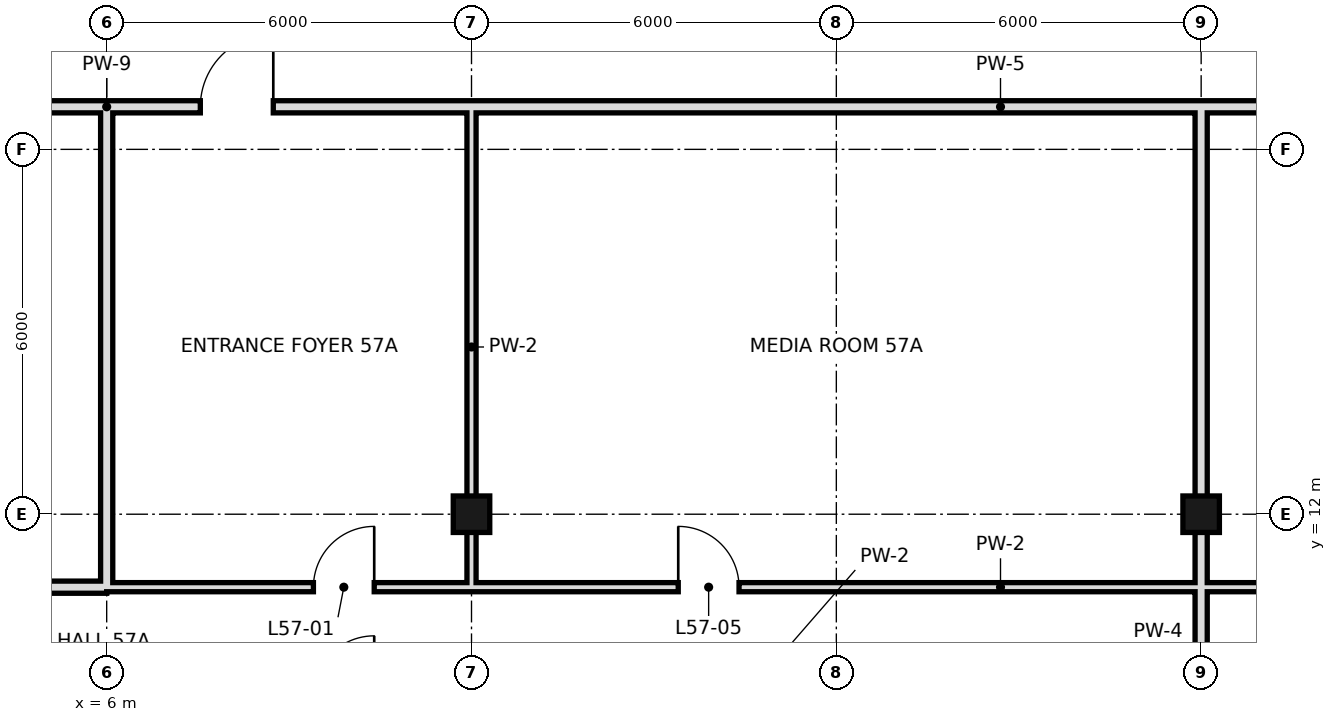
"""IFC4 building model, lengths in metres.
Left out: names, types, materials, properties, quantities, classifications, styles, units other than length and angle.
Written with IfcOpenShell. Run it as: python <this file> out.ifc"""

import sys

from ifc_helpers import new_model, si_unit, direction, frame, frame_2d, origin, origin_2d, place, context, subcontext, project, spatial, rectangle, hollow_rectangle, extrude, element, fill, save


model = new_model("IFC4")
c1 = context("Model", 3, precision=1e-05, world=origin(), true_north=direction((0.0, 1.0)))
c2 = subcontext(c1, "Body", "Model", "MODEL_VIEW")
j1 = project(units=[si_unit("LENGTHUNIT", "METRE"), si_unit("PLANEANGLEUNIT", "RADIAN")], contexts=[c1])
p1 = place(None, origin())
s1 = spatial("IfcSite", under=j1, at=p1, CompositionType="ELEMENT")
p2 = place(p1, origin())
s2 = spatial("IfcBuilding", under=s1, at=p2, CompositionType="ELEMENT")
p3 = place(p2, frame((0.0, 0.0, 243.2)))
s3 = spatial("IfcBuildingStorey", under=s2, at=p3, CompositionType="ELEMENT", Elevation=243.2)
for number, where, z_axis, x_axis in (
    (1, (12.0, 12.0, 0.0), (0.0, 0.0, 1.0), (1.0, 0.0, 0.0)),
    (2, (24.0, 12.0, 0.0), (0.0, 0.0, 1.0), (1.0, 0.0, 0.0)),
):
    element("IfcColumn", number, at=place(p3, frame(where, z_axis=z_axis, x_axis=x_axis)), inside=s3, PredefinedType="COLUMN", context=c2, shape_type="SweptSolid", body=[
        extrude(hollow_rectangle(XDim=0.6, YDim=0.6, WallThickness=0.028, at=origin_2d()), origin(), (0.0, 0.0, 1.0), 3.6),
    ])
p4 = place(p3, frame((12.0, 10.8, 0.0), z_axis=(0.0, 0.0, 1.0), x_axis=(0.0, 1.0, 0.0)))
e3 = element("IfcWall", 3, at=p4, inside=s3, PredefinedType="PARTITIONING", context=c2, shape_type="SweptSolid", body=[
    extrude(rectangle(XDim=7.9, YDim=0.15, at=frame_2d((3.95, 0.0))), origin(), (0.0, 0.0, 1.0), 2.72),
])
p5 = place(p3, frame((24.0, 0.0, 0.0), z_axis=(0.0, 0.0, 1.0), x_axis=(0.0, 1.0, 0.0)))
e4 = element("IfcWall", 4, at=p5, inside=s3, PredefinedType="SOLIDWALL", context=c2, shape_type="SweptSolid", body=[
    extrude(rectangle(XDim=18.7, YDim=0.2, at=frame_2d((9.35, 0.0))), origin(), (0.0, 0.0, 1.0), 2.72),
])
p6 = place(p3, frame((6.0, 10.8, 0.0), z_axis=(0.0, 0.0, 1.0), x_axis=(0.0, 1.0, 0.0)))
e5 = element("IfcWall", 5, at=p6, inside=s3, PredefinedType="SOLIDWALL", context=c2, shape_type="SweptSolid", body=[
    extrude(rectangle(XDim=7.9, YDim=0.2, at=frame_2d((3.95, 0.0))), origin(), (0.0, 0.0, 1.0), 2.72),
])
p7 = place(p3, frame((0.6, 10.8, 0.0), z_axis=(0.0, 0.0, 1.0), x_axis=(1.0, 0.0, 0.0)))
e6 = element("IfcWall", 6, at=p7, inside=s3, PredefinedType="SOLIDWALL", context=c2, shape_type="SweptSolid", body=[
    extrude(rectangle(XDim=5.4, YDim=0.2, at=frame_2d((2.7, 0.0))), origin(), (0.0, 0.0, 1.0), 2.72),
])
p8 = place(p7, frame((2.2, 0.0, 0.0)))
e7 = element("IfcOpeningElement", 7, at=p8, cuts=e6, PredefinedType="OPENING", context=c2, shape_type="SweptSolid", body=[
    extrude(rectangle(XDim=1.0, YDim=2.4, at=frame_2d((0.5, 1.2))), frame((0.0, 0.11, 0.0), z_axis=(0.0, -1.0, 0.0), x_axis=(1.0, 0.0, 0.0)), (0.0, 0.0, 1.0), 0.22),
])
p9 = place(p3, frame((6.0, 10.8, 0.0), z_axis=(0.0, 0.0, 1.0), x_axis=(1.0, 0.0, 0.0)))
e8 = element("IfcWall", 8, at=p9, inside=s3, PredefinedType="PARTITIONING", context=c2, shape_type="SweptSolid", body=[
    extrude(rectangle(XDim=29.4, YDim=0.15, at=frame_2d((14.7, 0.0))), origin(), (0.0, 0.0, 1.0), 3.42),
])
p10 = place(p9, frame((3.4, 0.0, 0.0)))
e9 = element("IfcOpeningElement", 9, at=p10, cuts=e8, PredefinedType="OPENING", context=c2, shape_type="SweptSolid", body=[
    extrude(rectangle(XDim=1.0, YDim=2.4, at=frame_2d((0.5, 1.2))), frame((0.0, 0.085, 0.0), z_axis=(0.0, -1.0, 0.0), x_axis=(1.0, 0.0, 0.0)), (0.0, 0.0, 1.0), 0.17),
])
p11 = place(p9, frame((9.4, 0.0, 0.0)))
e10 = element("IfcOpeningElement", 10, at=p11, cuts=e8, PredefinedType="OPENING", context=c2, shape_type="SweptSolid", body=[
    extrude(rectangle(XDim=1.0, YDim=2.4, at=frame_2d((0.5, 1.2))), frame((0.0, 0.085, 0.0), z_axis=(0.0, -1.0, 0.0), x_axis=(1.0, 0.0, 0.0)), (0.0, 0.0, 1.0), 0.17),
])
p12 = place(p9, frame((19.3, 0.0, 0.0)))
e11 = element("IfcOpeningElement", 11, at=p12, cuts=e8, PredefinedType="OPENING", context=c2, shape_type="SweptSolid", body=[
    extrude(rectangle(XDim=1.0, YDim=2.4, at=frame_2d((0.5, 1.2))), frame((0.0, 0.085, 0.0), z_axis=(0.0, -1.0, 0.0), x_axis=(1.0, 0.0, 0.0)), (0.0, 0.0, 1.0), 0.17),
])
p13 = place(p9, frame((25.0, 0.0, 0.0)))
e12 = element("IfcOpeningElement", 12, at=p13, cuts=e8, PredefinedType="OPENING", context=c2, shape_type="SweptSolid", body=[
    extrude(rectangle(XDim=1.0, YDim=2.4, at=frame_2d((0.5, 1.2))), frame((0.0, 0.085, 0.0), z_axis=(0.0, -1.0, 0.0), x_axis=(1.0, 0.0, 0.0)), (0.0, 0.0, 1.0), 0.17),
])
p14 = place(p3, frame((6.0, 18.7, 0.0), z_axis=(0.0, 0.0, 1.0), x_axis=(1.0, 0.0, 0.0)))
e13 = element("IfcWall", 13, at=p14, inside=s3, PredefinedType="SOLIDWALL", context=c2, shape_type="SweptSolid", body=[
    extrude(rectangle(XDim=29.4, YDim=0.2, at=frame_2d((14.7, 0.0))), origin(), (0.0, 0.0, 1.0), 2.72),
])
p15 = place(p14, frame((1.54, 0.0, 0.0)))
e14 = element("IfcOpeningElement", 14, at=p15, cuts=e13, PredefinedType="OPENING", context=c2, shape_type="SweptSolid", body=[
    extrude(rectangle(XDim=1.2, YDim=2.4, at=frame_2d((0.6, 1.2))), frame((0.0, 0.11, 0.0), z_axis=(0.0, -1.0, 0.0), x_axis=(1.0, 0.0, 0.0)), (0.0, 0.0, 1.0), 0.22),
])
p16 = place(p14, frame((19.58, 0.0, 0.0)))
e15 = element("IfcOpeningElement", 15, at=p16, cuts=e13, PredefinedType="OPENING", context=c2, shape_type="SweptSolid", body=[
    extrude(rectangle(XDim=1.2, YDim=2.4, at=frame_2d((0.6, 1.2))), frame((0.0, 0.11, 0.0), z_axis=(0.0, -1.0, 0.0), x_axis=(1.0, 0.0, 0.0)), (0.0, 0.0, 1.0), 0.22),
])
p17 = place(p3, frame((3.1, 18.7, 0.0), z_axis=(0.0, 0.0, 1.0), x_axis=(1.0, 0.0, 0.0)))
e16 = element("IfcWall", 16, at=p17, inside=s3, PredefinedType="SOLIDWALL", context=c2, shape_type="SweptSolid", body=[
    extrude(rectangle(XDim=2.9, YDim=0.2, at=frame_2d((1.45, 0.0))), origin(), (0.0, 0.0, 1.0), 2.72),
])
p18 = place(p10, frame((1.0, 0.0, 0.0), z_axis=(0.0, 0.0, 1.0), x_axis=(-1.0, 0.0, 0.0)))
e17 = element("IfcDoor", 17, at=p18, inside=s3, OperationType="SINGLE_SWING_LEFT", PredefinedType="DOOR", context=c2, shape_type="SweptSolid", body=[
    extrude(rectangle(XDim=1.0, YDim=2.4, at=frame_2d((0.5, 1.2))), frame((0.0, 0.025, 0.0), z_axis=(0.0, -1.0, 0.0), x_axis=(1.0, 0.0, 0.0)), (0.0, 0.0, 1.0), 0.05),
])
fill(e9, e17)
p19 = place(p11, origin())
e18 = element("IfcDoor", 18, at=p19, inside=s3, OperationType="SINGLE_SWING_LEFT", PredefinedType="DOOR", context=c2, shape_type="SweptSolid", body=[
    extrude(rectangle(XDim=1.0, YDim=2.4, at=frame_2d((0.5, 1.2))), frame((0.0, 0.025, 0.0), z_axis=(0.0, -1.0, 0.0), x_axis=(1.0, 0.0, 0.0)), (0.0, 0.0, 1.0), 0.05),
])
fill(e10, e18)
p20 = place(p15, frame((1.2, 0.0, 0.0), z_axis=(0.0, 0.0, 1.0), x_axis=(-1.0, 0.0, 0.0)))
e19 = element("IfcDoor", 19, at=p20, inside=s3, OperationType="SINGLE_SWING_LEFT", PredefinedType="DOOR", context=c2, shape_type="SweptSolid", body=[
    extrude(rectangle(XDim=1.2, YDim=2.4, at=frame_2d((0.6, 1.2))), frame((0.0, 0.025, 0.0), z_axis=(0.0, -1.0, 0.0), x_axis=(1.0, 0.0, 0.0)), (0.0, 0.0, 1.0), 0.05),
])
fill(e14, e19)
save(model, sys.argv[1])
